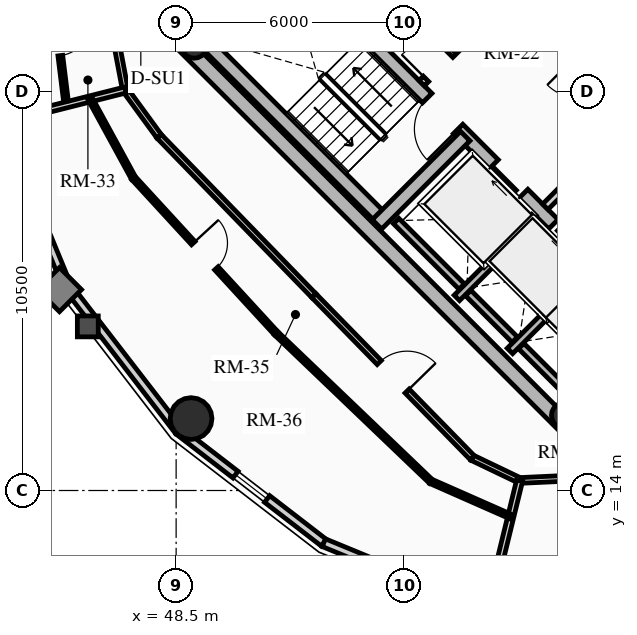
"""IFC4 building model, lengths in metres.
Left out: names, types, materials, properties, quantities, classifications, styles, units other than length and angle.
Written with IfcOpenShell. Run it as: python <this file> out.ifc"""

import sys

from ifc_helpers import new_model, si_unit, direction, frame, frame_2d, origin, origin_2d, place, context, subcontext, project, spatial, rectangle, circle, hollow_circle, extrude, source, transform, mapped, element, fill, save


model = new_model("IFC4")
c1 = context("Model", 3, precision=1e-05, world=origin(), true_north=direction((0.0, 1.0)))
c2 = subcontext(c1, "Body", "Model", "MODEL_VIEW")
j1 = project(units=[si_unit("LENGTHUNIT", "METRE"), si_unit("PLANEANGLEUNIT", "RADIAN")], contexts=[c1])
p1 = place(None, origin())
s1 = spatial("IfcSite", under=j1, at=p1, CompositionType="ELEMENT")
p2 = place(p1, origin())
s2 = spatial("IfcBuilding", under=s1, at=p2, CompositionType="ELEMENT")
p3 = place(p2, frame((0.0, 0.0, 219.94)))
s3 = spatial("IfcBuildingStorey", under=s2, at=p3, CompositionType="ELEMENT", Elevation=219.94)
for number, where, z_axis, x_axis in (
    (1, (58.702, 15.732, 0.0), (0.0, 0.0, 1.0), (-0.707, 0.707, 0.0)),
    (2, (66.268, 23.298, 0.0), (0.0, 0.0, 1.0), (-0.707, 0.707, 0.0)),
):
    element("IfcWall", number, at=place(p3, frame(where, z_axis=z_axis, x_axis=x_axis)), inside=s3, PredefinedType="SHEAR", context=c2, shape_type="SweptSolid", body=[
        extrude(rectangle(XDim=14.1, YDim=0.4, at=frame_2d((7.05, 0.0))), origin(), (0.0, 0.0, 1.0), 2.91),
    ])
p4 = place(p3, frame((58.561, 15.873, 0.0), z_axis=(0.0, 0.0, 1.0), x_axis=(0.707106781187, 0.707106781187, 0.0)))
e3 = element("IfcWall", 3, at=p4, inside=s3, PredefinedType="SHEAR", context=c2, shape_type="SweptSolid", body=[
    extrude(rectangle(XDim=10.7, YDim=0.4, at=frame_2d((5.35, 0.0))), origin(), (0.0, 0.0, 1.0), 2.91),
])
m1 = source(origin(), c2, "Body", "SweptSolid", [
    extrude(rectangle(XDim=1.5, YDim=2.02, at=frame_2d((0.75, 1.01))), frame((0.0, 0.21, 0.0), z_axis=(0.0, -1.0, 0.0), x_axis=(1.0, 0.0, 0.0)), (0.0, 0.0, 1.0), 0.42),
])
p5 = place(p4, frame((5.45, 0.0, 0.0)))
e4 = element("IfcOpeningElement", 4, at=p5, cuts=e3, PredefinedType="OPENING", context=c2, shape_type="MappedRepresentation", body=[
    mapped(m1, transform((0.0, 0.0, 0.0), x_axis=(1.0, 0.0, 0.0), y_axis=(0.0, 1.0, 0.0), z_axis=(0.0, 0.0, 1.0), scale=1.0)),
])
p6 = place(p3, frame((48.873, 25.561, 0.0), z_axis=(0.0, 0.0, 1.0), x_axis=(0.707106781187, 0.707106781187, 0.0)))
e5 = element("IfcWall", 5, at=p6, inside=s3, PredefinedType="SHEAR", context=c2, shape_type="SweptSolid", body=[
    extrude(rectangle(XDim=10.7, YDim=0.4, at=frame_2d((5.35, 0.0))), origin(), (0.0, 0.0, 1.0), 2.91),
])
p7 = place(p6, frame((4.6, 0.0, 0.0)))
e6 = element("IfcOpeningElement", 6, at=p7, cuts=e5, PredefinedType="OPENING", context=c2, shape_type="MappedRepresentation", body=[
    mapped(m1, transform((0.0, 0.0, 0.0), x_axis=(1.0, 0.0, 0.0), y_axis=(0.0, 1.0, 0.0), z_axis=(0.0, 0.0, 1.0), scale=1.0)),
])
p8 = place(p3, frame((61.06, 18.373, 0.0), z_axis=(0.0, 0.0, 1.0), x_axis=(-0.707106781187, 0.707106781187, 0.0)))
e7 = element("IfcWall", 7, at=p8, inside=s3, PredefinedType="SHEAR", context=c2, shape_type="SweptSolid", body=[
    extrude(rectangle(XDim=13.7, YDim=0.35, at=frame_2d((6.85, 0.0))), origin(), (0.0, 0.0, 1.0), 2.91),
])
m2 = source(origin(), c2, "Body", "SweptSolid", [
    extrude(rectangle(XDim=1.1, YDim=2.015, at=frame_2d((0.55, 1.007))), frame((0.0, 0.185, 0.0), z_axis=(0.0, -1.0, 0.0), x_axis=(1.0, 0.0, 0.0)), (0.0, 0.0, 1.0), 0.37),
])
p9 = place(p8, frame((4.85, 0.0, 0.0)))
e8 = element("IfcOpeningElement", 8, at=p9, cuts=e7, PredefinedType="OPENING", context=c2, shape_type="MappedRepresentation", body=[
    mapped(m2, transform((0.0, 0.0, 0.0), x_axis=(1.0, 0.0, 0.0), y_axis=(0.0, 1.0, 0.0), z_axis=(0.0, 0.0, 1.0), scale=1.0)),
])
p10 = place(p8, frame((0.625, 0.0, 0.0)))
e9 = element("IfcOpeningElement", 9, at=p10, cuts=e7, PredefinedType="OPENING", context=c2, shape_type="MappedRepresentation", body=[
    mapped(m2, transform((0.0, 0.0, 0.0), x_axis=(1.0, 0.0, 0.0), y_axis=(0.0, 1.0, 0.0), z_axis=(0.0, 0.0, 1.0), scale=1.0)),
])
p11 = place(p8, frame((2.625, 0.0, 0.0)))
e10 = element("IfcOpeningElement", 10, at=p11, cuts=e7, PredefinedType="OPENING", context=c2, shape_type="MappedRepresentation", body=[
    mapped(m2, transform((0.0, 0.0, 0.0), x_axis=(1.0, 0.0, 0.0), y_axis=(0.0, 1.0, 0.0), z_axis=(0.0, 0.0, 1.0), scale=1.0)),
])
m3 = source(origin(), c2, "Body", "SweptSolid", [
    extrude(rectangle(XDim=1.15, YDim=2.02, at=frame_2d((0.575, 1.01))), frame((0.0, 0.185, 0.0), z_axis=(0.0, -1.0, 0.0), x_axis=(1.0, 0.0, 0.0)), (0.0, 0.0, 1.0), 0.37),
])
p12 = place(p8, frame((7.27, 0.0, 0.0)))
e11 = element("IfcOpeningElement", 11, at=p12, cuts=e7, PredefinedType="OPENING", context=c2, shape_type="MappedRepresentation", body=[
    mapped(m3, transform((0.0, 0.0, 0.0), x_axis=(1.0, 0.0, 0.0), y_axis=(0.0, 1.0, 0.0), z_axis=(0.0, 0.0, 1.0), scale=1.0)),
])
p13 = place(p3, frame((63.627, 20.94, 0.0), z_axis=(0.0, 0.0, 1.0), x_axis=(-0.707119496762, 0.707094065383, 0.0)))
e12 = element("IfcWall", 12, at=p13, inside=s3, PredefinedType="SHEAR", context=c2, shape_type="SweptSolid", body=[
    extrude(rectangle(XDim=9.6, YDim=0.35, at=frame_2d((4.8, 0.0))), origin(), (0.0, 0.0, 1.0), 2.91),
])
p14 = place(p13, frame((5.28, 0.0, 0.0)))
e13 = element("IfcOpeningElement", 13, at=p14, cuts=e12, PredefinedType="OPENING", context=c2, shape_type="MappedRepresentation", body=[
    mapped(m3, transform((0.0, 0.0, 0.0), x_axis=(1.0, 0.0, 0.0), y_axis=(0.0, 1.0, 0.0), z_axis=(0.0, 0.0, 1.0), scale=1.0)),
])
p15 = place(p3, frame((53.922, 21.141, 0.0), z_axis=(0.0, 0.0, 1.0), x_axis=(-0.707106781187, 0.707106781187, 0.0)))
e14 = element("IfcWall", 14, at=p15, inside=s3, PredefinedType="SHEAR", context=c2, shape_type="SweptSolid", body=[
    extrude(rectangle(XDim=6.695, YDim=0.35, at=frame_2d((3.348, 0.0))), origin(), (0.0, 0.0, 1.0), 2.91),
])
p16 = place(p3, frame((53.784, 21.003, 0.0), z_axis=(0.0, 0.0, 1.0), x_axis=(0.707106781187, 0.707106781187, 0.0)))
e15 = element("IfcWall", 15, at=p16, inside=s3, PredefinedType="SHEAR", context=c2, shape_type="SweptSolid", body=[
    extrude(rectangle(XDim=3.285, YDim=0.35, at=frame_2d((1.643, 0.0))), origin(), (0.0, 0.0, 1.0), 2.91),
])
for number, where, z_axis, x_axis in (
    (16, (58.706, 15.976, 0.0), (0.0, 0.0, 1.0), (0.707, 0.707, 0.0)),
    (17, (48.976, 25.706, 0.0), (0.0, 0.0, 1.0), (0.707, 0.707, 0.0)),
):
    element("IfcColumn", number, at=place(p3, frame(where, z_axis=z_axis, x_axis=x_axis)), inside=s3, PredefinedType="COLUMN", context=c2, shape_type="SweptSolid", body=[
        extrude(hollow_circle(Radius=0.33, WallThickness=0.025, at=origin_2d()), origin(), (0.0, 0.0, 1.0), 2.91),
    ])
p17 = place(p3, frame((48.893, 15.893, 0.0), z_axis=(0.0, 0.0, 1.0), x_axis=(1.0, 0.0, 0.0)))
e18 = element("IfcColumn", 18, at=p17, inside=s3, PredefinedType="USERDEFINED", context=c2, shape_type="SweptSolid", body=[
    extrude(circle(Radius=0.55, at=origin_2d()), origin(), (0.0, 0.0, 1.0), 2.91),
])
p18 = place(p3, frame((45.626, 19.387, 0.0), z_axis=(0.0, 0.0, 1.0), x_axis=(-0.381309704956, 0.924447353237, 0.0)))
e19 = element("IfcWall", 19, at=p18, inside=s3, PredefinedType="SOLIDWALL", context=c2, shape_type="SweptSolid", body=[
    extrude(rectangle(XDim=4.671, YDim=0.22, at=frame_2d((2.335, 0.0))), origin(), (0.0, 0.0, 1.0), 2.322),
])
m4 = source(origin(), c2, "Body", "SweptSolid", [
    extrude(rectangle(XDim=1.05, YDim=1.3, at=frame_2d((0.525, 0.65))), frame((0.0, 0.12, 0.0), z_axis=(0.0, -1.0, 0.0), x_axis=(1.0, 0.0, 0.0)), (0.0, 0.0, 1.0), 0.24),
])
p19 = place(p18, frame((1.81, 0.0, 0.65)))
e20 = element("IfcOpeningElement", 20, at=p19, cuts=e19, PredefinedType="OPENING", context=c2, shape_type="MappedRepresentation", body=[
    mapped(m4, transform((0.0, 0.0, 0.0), x_axis=(1.0, 0.0, 0.0), y_axis=(0.0, 1.0, 0.0), z_axis=(0.0, 0.0, 1.0), scale=1.0)),
])
p20 = place(p3, frame((48.569, 15.569, 0.0), z_axis=(0.0, 0.0, 1.0), x_axis=(-0.610523083886, 0.791998462147, 0.0)))
e21 = element("IfcWall", 21, at=p20, inside=s3, PredefinedType="SOLIDWALL", context=c2, shape_type="SweptSolid", body=[
    extrude(rectangle(XDim=4.82, YDim=0.22, at=frame_2d((2.41, 0.0))), origin(), (0.0, 0.0, 1.0), 2.322),
])
p21 = place(p3, frame((52.387, 12.626, 0.0), z_axis=(0.0, 0.0, 1.0), x_axis=(-0.791998462147, 0.610523083886, 0.0)))
e22 = element("IfcWall", 22, at=p21, inside=s3, PredefinedType="SOLIDWALL", context=c2, shape_type="SweptSolid", body=[
    extrude(rectangle(XDim=4.82, YDim=0.22, at=frame_2d((2.41, 0.0))), origin(), (0.0, 0.0, 1.0), 2.322),
])
p22 = place(p21, frame((1.885, 0.0, 0.65)))
e23 = element("IfcOpeningElement", 23, at=p22, cuts=e22, PredefinedType="OPENING", context=c2, shape_type="MappedRepresentation", body=[
    mapped(m4, transform((0.0, 0.0, 0.0), x_axis=(1.0, 0.0, 0.0), y_axis=(0.0, 1.0, 0.0), z_axis=(0.0, 0.0, 1.0), scale=1.0)),
])
p23 = place(p3, frame((56.705, 10.845, 0.0), z_axis=(0.0, 0.0, 1.0), x_axis=(-0.924447353237, 0.381309704956, 0.0)))
e24 = element("IfcWall", 24, at=p23, inside=s3, PredefinedType="SOLIDWALL", context=c2, shape_type="SweptSolid", body=[
    extrude(rectangle(XDim=4.671, YDim=0.22, at=frame_2d((2.335, 0.0))), origin(), (0.0, 0.0, 1.0), 2.322),
])
p24 = place(p3, frame((55.888, 19.069, 0.0), z_axis=(0.0, 0.0, 1.0), x_axis=(0.707106781187, 0.707106781187, 0.0)))
e25 = element("IfcWall", 25, at=p24, inside=s3, PredefinedType="SHEAR", context=c2, shape_type="SweptSolid", body=[
    extrude(rectangle(XDim=2.97, YDim=0.2, at=frame_2d((1.485, 0.0))), origin(), (0.0, 0.0, 1.0), 2.91),
])
p25 = place(p3, frame((56.015, 19.366, 0.0), z_axis=(0.0, 0.0, 1.0), x_axis=(-0.707106781187, 0.707106781187, 0.0)))
e26 = element("IfcWall", 26, at=p25, inside=s3, PredefinedType="SHEAR", context=c2, shape_type="SweptSolid", body=[
    extrude(rectangle(XDim=2.44, YDim=0.2, at=frame_2d((1.22, 0.0))), origin(), (0.0, 0.0, 1.0), 2.91),
])
p26 = place(p3, frame((57.284, 17.673, 0.0), z_axis=(0.0, 0.0, 1.0), x_axis=(0.707147878904, 0.70706568108, 0.0)))
e27 = element("IfcWall", 27, at=p26, inside=s3, PredefinedType="SHEAR", context=c2, shape_type="SweptSolid", body=[
    extrude(rectangle(XDim=2.97, YDim=0.2, at=frame_2d((1.485, 0.0))), origin(), (0.0, 0.0, 1.0), 2.91),
])
p27 = place(p3, frame((57.412, 17.97, 0.0), z_axis=(0.0, 0.0, 1.0), x_axis=(-0.707106781187, 0.707106781187, 0.0)))
e28 = element("IfcWall", 28, at=p27, inside=s3, PredefinedType="SHEAR", context=c2, shape_type="SweptSolid", body=[
    extrude(rectangle(XDim=1.735, YDim=0.2, at=frame_2d((0.867, 0.0))), origin(), (0.0, 0.0, 1.0), 2.91),
])
p28 = place(p3, frame((58.737, 16.644, 0.0), z_axis=(0.0, 0.0, 1.0), x_axis=(-0.707032117043, 0.707181437447, 0.0)))
e29 = element("IfcWall", 29, at=p28, inside=s3, PredefinedType="SHEAR", context=c2, shape_type="SweptSolid", body=[
    extrude(rectangle(XDim=1.635, YDim=0.2, at=frame_2d((0.817, 0.0))), origin(), (0.0, 0.0, 1.0), 2.91),
])
p29 = place(p3, frame((58.214, 21.467, 0.0), z_axis=(0.0, 0.0, 1.0), x_axis=(0.707106781187, 0.707106781187, 0.0)))
e30 = element("IfcWall", 30, at=p29, inside=s3, PredefinedType="PARTITIONING", context=c2, shape_type="SweptSolid", body=[
    extrude(rectangle(XDim=3.28, YDim=0.2, at=frame_2d((1.64, 0.0))), origin(), (0.0, 0.0, 1.0), 2.685),
])
m5 = source(origin(), c2, "Body", "SweptSolid", [
    extrude(rectangle(XDim=1.5, YDim=2.02, at=frame_2d((0.75, 1.01))), frame((0.0, 0.11, 0.0), z_axis=(0.0, -1.0, 0.0), x_axis=(1.0, 0.0, 0.0)), (0.0, 0.0, 1.0), 0.22),
])
p30 = place(p29, frame((1.55, 0.0, 0.0)))
e31 = element("IfcOpeningElement", 31, at=p30, cuts=e30, PredefinedType="OPENING", context=c2, shape_type="MappedRepresentation", body=[
    mapped(m5, transform((0.0, 0.0, 0.0), x_axis=(1.0, 0.0, 0.0), y_axis=(0.0, 1.0, 0.0), z_axis=(0.0, 0.0, 1.0), scale=1.0)),
])
p31 = place(p3, frame((54.961, 24.719, 0.0), z_axis=(0.0, 0.0, 1.0), x_axis=(0.707106781187, 0.707106781187, 0.0)))
e32 = element("IfcWall", 32, at=p31, inside=s3, PredefinedType="PARTITIONING", context=c2, shape_type="SweptSolid", body=[
    extrude(rectangle(XDim=3.28, YDim=0.2, at=frame_2d((1.64, 0.0))), origin(), (0.0, 0.0, 1.0), 2.685),
])
m6 = source(origin(), c2, "Body", "SweptSolid", [
    extrude(rectangle(XDim=0.9, YDim=2.005, at=frame_2d((0.45, 1.002))), frame((0.0, 0.11, 0.0), z_axis=(0.0, -1.0, 0.0), x_axis=(1.0, 0.0, 0.0)), (0.0, 0.0, 1.0), 0.22),
])
p32 = place(p31, frame((0.16, 0.0, 0.0)))
e33 = element("IfcOpeningElement", 33, at=p32, cuts=e32, PredefinedType="OPENING", context=c2, shape_type="MappedRepresentation", body=[
    mapped(m6, transform((0.0, 0.0, 0.0), x_axis=(1.0, 0.0, 0.0), y_axis=(0.0, 1.0, 0.0), z_axis=(0.0, 0.0, 1.0), scale=1.0)),
])
p33 = place(p3, frame((46.912, 25.862, 0.0), z_axis=(0.0, 0.0, 1.0), x_axis=(0.186095172215, -0.98253172309, 0.0)))
e34 = element("IfcWall", 34, at=p33, inside=s3, PredefinedType="PARTITIONING", context=c2, shape_type="SweptSolid", body=[
    extrude(rectangle(XDim=1.346, YDim=0.15, at=frame_2d((0.673, 0.0))), origin(), (0.0, 0.0, 1.0), 2.322),
])
p34 = place(p3, frame((47.163, 24.54, 0.0), z_axis=(0.0, 0.0, 1.0), x_axis=(0.589711902124, -0.807613690135, 0.0)))
e35 = element("IfcWall", 35, at=p34, inside=s3, PredefinedType="PARTITIONING", context=c2, shape_type="SweptSolid", body=[
    extrude(rectangle(XDim=1.507, YDim=0.15, at=frame_2d((0.753, 0.0))), origin(), (0.0, 0.0, 1.0), 2.255),
])
p35 = place(p3, frame((48.052, 23.323, 0.0), z_axis=(0.0, 0.0, 1.0), x_axis=(0.696573981306, -0.717484974454, 0.0)))
e36 = element("IfcWall", 36, at=p35, inside=s3, PredefinedType="PARTITIONING", context=c2, shape_type="SweptSolid", body=[
    extrude(rectangle(XDim=5.849, YDim=0.15, at=frame_2d((2.925, 0.0))), origin(), (0.0, 0.0, 1.0), 2.685),
])
p36 = place(p3, frame((52.126, 19.126, 0.0), z_axis=(0.0, 0.0, 1.0), x_axis=(0.698979087027, -0.715142108884, 0.0)))
e37 = element("IfcWall", 37, at=p36, inside=s3, PredefinedType="PARTITIONING", context=c2, shape_type="SweptSolid", body=[
    extrude(rectangle(XDim=5.966, YDim=0.15, at=frame_2d((2.983, 0.0))), origin(), (0.0, 0.0, 1.0), 2.322),
])
m7 = source(origin(), c2, "Body", "SweptSolid", [
    extrude(rectangle(XDim=1.05, YDim=2.015, at=frame_2d((0.525, 1.007))), frame((0.0, 0.085, 0.0), z_axis=(0.0, -1.0, 0.0), x_axis=(1.0, 0.0, 0.0)), (0.0, 0.0, 1.0), 0.17),
])
p37 = place(p36, frame((2.458, 0.0, 0.0)))
e38 = element("IfcOpeningElement", 38, at=p37, cuts=e37, PredefinedType="OPENING", context=c2, shape_type="MappedRepresentation", body=[
    mapped(m7, transform((0.0, 0.0, 0.0), x_axis=(1.0, 0.0, 0.0), y_axis=(0.0, 1.0, 0.0), z_axis=(0.0, 0.0, 1.0), scale=1.0)),
])
p38 = place(p3, frame((56.296, 14.859, 0.0), z_axis=(0.0, 0.0, 1.0), x_axis=(0.90178292445, -0.432189260823, 0.0)))
e39 = element("IfcWall", 39, at=p38, inside=s3, PredefinedType="PARTITIONING", context=c2, shape_type="SweptSolid", body=[
    extrude(rectangle(XDim=1.377, YDim=0.15, at=frame_2d((0.688, 0.0))), origin(), (0.0, 0.0, 1.0), 2.255),
])
p39 = place(p3, frame((57.538, 14.264, 0.0), z_axis=(0.0, 0.0, 1.0), x_axis=(0.99892990172, 0.046249880546, 0.0)))
e40 = element("IfcWall", 40, at=p39, inside=s3, PredefinedType="PARTITIONING", context=c2, shape_type="SweptSolid", body=[
    extrude(rectangle(XDim=1.446, YDim=0.15, at=frame_2d((0.723, 0.0))), origin(), (0.0, 0.0, 1.0), 2.322),
])
p40 = place(p3, frame((47.163, 24.54, 0.0), z_axis=(0.0, 0.0, 1.0), x_axis=(-0.9696166611, -0.244629373781, 0.0)))
e41 = element("IfcWall", 41, at=p40, inside=s3, PredefinedType="PARTITIONING", context=c2, shape_type="SweptSolid", body=[
    extrude(rectangle(XDim=3.401, YDim=0.16, at=frame_2d((1.701, 0.0))), origin(), (0.0, 0.0, 1.0), 2.322),
])
p41 = place(p3, frame((57.538, 14.264, 0.0), z_axis=(0.0, 0.0, 1.0), x_axis=(-0.237377006249, -0.971417601706, 0.0)))
e42 = element("IfcWall", 42, at=p41, inside=s3, PredefinedType="PARTITIONING", context=c2, shape_type="SweptSolid", body=[
    extrude(rectangle(XDim=3.499, YDim=0.16, at=frame_2d((1.75, 0.0))), origin(), (0.0, 0.0, 1.0), 2.322),
])
p42 = place(p3, frame((45.328, 26.457, 0.0), z_axis=(0.0, 0.0, 1.0), x_axis=(0.122605181354, -0.992455525203, 0.0)))
e43 = element("IfcWall", 43, at=p42, inside=s3, PredefinedType="PARTITIONING", context=c2, shape_type="SweptSolid", body=[
    extrude(rectangle(XDim=2.228, YDim=0.125, at=frame_2d((1.114, 0.0))), origin(), (0.0, 0.0, 1.0), 2.322),
])
m8 = source(origin(), c2, "Body", "SweptSolid", [
    extrude(rectangle(XDim=0.9, YDim=2.005, at=frame_2d((0.45, 1.002))), frame((0.0, 0.073, 0.0), z_axis=(0.0, -1.0, 0.0), x_axis=(1.0, 0.0, 0.0)), (0.0, 0.0, 1.0), 0.145),
])
p43 = place(p42, frame((0.12, 0.0, 0.0)))
e44 = element("IfcOpeningElement", 44, at=p43, cuts=e43, PredefinedType="OPENING", context=c2, shape_type="MappedRepresentation", body=[
    mapped(m8, transform((0.0, 0.0, 0.0), x_axis=(1.0, 0.0, 0.0), y_axis=(0.0, 1.0, 0.0), z_axis=(0.0, 0.0, 1.0), scale=1.0)),
])
p44 = place(p3, frame((46.24, 24.307, 0.0), z_axis=(0.0, 0.0, 1.0), x_axis=(0.479212341296, -0.87769899849, 0.0)))
e45 = element("IfcWall", 45, at=p44, inside=s3, PredefinedType="PARTITIONING", context=c2, shape_type="SweptSolid", body=[
    extrude(rectangle(XDim=2.374, YDim=0.125, at=frame_2d((1.187, 0.0))), origin(), (0.0, 0.0, 1.0), 2.255),
])
p45 = place(p3, frame((47.377, 22.223, 0.0), z_axis=(0.0, 0.0, 1.0), x_axis=(0.676554417653, -0.736392639802, 0.0)))
e46 = element("IfcWall", 46, at=p45, inside=s3, PredefinedType="PARTITIONING", context=c2, shape_type="SweptSolid", body=[
    extrude(rectangle(XDim=5.553, YDim=0.125, at=frame_2d((2.776, 0.0))), origin(), (0.0, 0.0, 1.0), 2.685),
])
p46 = place(p45, frame((2.326, 0.0, 0.0)))
e47 = element("IfcOpeningElement", 47, at=p46, cuts=e46, PredefinedType="OPENING", context=c2, shape_type="MappedRepresentation", body=[
    mapped(m8, transform((0.0, 0.0, 0.0), x_axis=(1.0, 0.0, 0.0), y_axis=(0.0, 1.0, 0.0), z_axis=(0.0, 0.0, 1.0), scale=1.0)),
])
p47 = place(p3, frame((51.134, 18.134, 0.0), z_axis=(0.0, 0.0, 1.0), x_axis=(0.722450775654, -0.691422357721, 0.0)))
e48 = element("IfcWall", 48, at=p47, inside=s3, PredefinedType="PARTITIONING", context=c2, shape_type="SweptSolid", body=[
    extrude(rectangle(XDim=5.634, YDim=0.125, at=frame_2d((2.817, 0.0))), origin(), (0.0, 0.0, 1.0), 2.322),
])
p48 = place(p3, frame((55.204, 14.239, 0.0), z_axis=(0.0, 0.0, 1.0), x_axis=(0.914999746908, -0.403454412738, 0.0)))
e49 = element("IfcWall", 49, at=p48, inside=s3, PredefinedType="PARTITIONING", context=c2, shape_type="SweptSolid", body=[
    extrude(rectangle(XDim=2.297, YDim=0.125, at=frame_2d((1.148, 0.0))), origin(), (0.0, 0.0, 1.0), 2.255),
])
m9 = source(origin(), c2, "Body", "SweptSolid", [
    extrude(rectangle(XDim=1.05, YDim=1.3, at=frame_2d((0.525, 0.65))), frame((0.0, 0.03, 0.0), z_axis=(0.0, -1.0, 0.0), x_axis=(1.0, 0.0, 0.0)), (0.0, 0.0, 1.0), 0.06),
])
p49 = place(p22, origin())
e50 = element("IfcWindow", 50, at=p49, inside=s3, PartitioningType="SINGLE_PANEL", PredefinedType="WINDOW", context=c2, shape_type="MappedRepresentation", body=[
    mapped(m9, transform((0.0, 0.0, 0.0), x_axis=(1.0, 0.0, 0.0), y_axis=(0.0, 1.0, 0.0), z_axis=(0.0, 0.0, 1.0), scale=1.0)),
])
fill(e23, e50)
m10 = source(origin(), c2, "Body", "SweptSolid", [
    extrude(rectangle(XDim=1.1, YDim=2.015, at=frame_2d((0.55, 1.007))), frame((0.0, 0.025, 0.0), z_axis=(0.0, -1.0, 0.0), x_axis=(1.0, 0.0, 0.0)), (0.0, 0.0, 1.0), 0.05),
])
p50 = place(p9, origin())
e51 = element("IfcDoor", 51, at=p50, inside=s3, OperationType="SLIDING_TO_RIGHT", PredefinedType="DOOR", context=c2, shape_type="MappedRepresentation", body=[
    mapped(m10, transform((0.0, 0.0, 0.0), x_axis=(1.0, 0.0, 0.0), y_axis=(0.0, 1.0, 0.0), z_axis=(0.0, 0.0, 1.0), scale=1.0)),
])
fill(e8, e51)
p51 = place(p11, origin())
e52 = element("IfcDoor", 52, at=p51, inside=s3, OperationType="SLIDING_TO_LEFT", PredefinedType="DOOR", context=c2, shape_type="MappedRepresentation", body=[
    mapped(m10, transform((0.0, 0.0, 0.0), x_axis=(1.0, 0.0, 0.0), y_axis=(0.0, 1.0, 0.0), z_axis=(0.0, 0.0, 1.0), scale=1.0)),
])
fill(e10, e52)
m11 = source(origin(), c2, "Body", "SweptSolid", [
    extrude(rectangle(XDim=1.15, YDim=2.02, at=frame_2d((0.575, 1.01))), frame((0.0, 0.025, 0.0), z_axis=(0.0, -1.0, 0.0), x_axis=(1.0, 0.0, 0.0)), (0.0, 0.0, 1.0), 0.05),
])
p52 = place(p12, origin())
e53 = element("IfcDoor", 53, at=p52, inside=s3, OperationType="SINGLE_SWING_LEFT", PredefinedType="DOOR", context=c2, shape_type="MappedRepresentation", body=[
    mapped(m11, transform((0.0, 0.0, 0.0), x_axis=(1.0, 0.0, 0.0), y_axis=(0.0, 1.0, 0.0), z_axis=(0.0, 0.0, 1.0), scale=1.0)),
])
fill(e11, e53)
m12 = source(origin(), c2, "Body", "SweptSolid", [
    extrude(rectangle(XDim=0.9, YDim=2.005, at=frame_2d((0.45, 1.002))), frame((0.0, 0.025, 0.0), z_axis=(0.0, -1.0, 0.0), x_axis=(1.0, 0.0, 0.0)), (0.0, 0.0, 1.0), 0.05),
])
p53 = place(p32, origin())
e54 = element("IfcDoor", 54, at=p53, inside=s3, OperationType="SINGLE_SWING_LEFT", PredefinedType="DOOR", context=c2, shape_type="MappedRepresentation", body=[
    mapped(m12, transform((0.0, 0.0, 0.0), x_axis=(1.0, 0.0, 0.0), y_axis=(0.0, 1.0, 0.0), z_axis=(0.0, 0.0, 1.0), scale=1.0)),
])
fill(e33, e54)
p54 = place(p43, origin())
e55 = element("IfcDoor", 55, at=p54, inside=s3, OperationType="SINGLE_SWING_LEFT", PredefinedType="DOOR", context=c2, shape_type="MappedRepresentation", body=[
    mapped(m12, transform((0.0, 0.0, 0.0), x_axis=(1.0, 0.0, 0.0), y_axis=(0.0, 1.0, 0.0), z_axis=(0.0, 0.0, 1.0), scale=1.0)),
])
fill(e44, e55)
m13 = source(origin(), c2, "Body", "SweptSolid", [
    extrude(rectangle(XDim=1.05, YDim=2.015, at=frame_2d((0.525, 1.007))), frame((0.0, 0.025, 0.0), z_axis=(0.0, -1.0, 0.0), x_axis=(1.0, 0.0, 0.0)), (0.0, 0.0, 1.0), 0.05),
])
p55 = place(p37, origin())
e56 = element("IfcDoor", 56, at=p55, inside=s3, OperationType="SINGLE_SWING_RIGHT", PredefinedType="DOOR", context=c2, shape_type="MappedRepresentation", body=[
    mapped(m13, transform((0.0, 0.0, 0.0), x_axis=(1.0, 0.0, 0.0), y_axis=(0.0, 1.0, 0.0), z_axis=(0.0, 0.0, 1.0), scale=1.0)),
])
fill(e38, e56)
p56 = place(p46, origin())
e57 = element("IfcDoor", 57, at=p56, inside=s3, OperationType="SINGLE_SWING_LEFT", PredefinedType="DOOR", context=c2, shape_type="MappedRepresentation", body=[
    mapped(m12, transform((0.0, 0.0, 0.0), x_axis=(1.0, 0.0, 0.0), y_axis=(0.0, 1.0, 0.0), z_axis=(0.0, 0.0, 1.0), scale=1.0)),
])
fill(e47, e57)
save(model, sys.argv[1])
